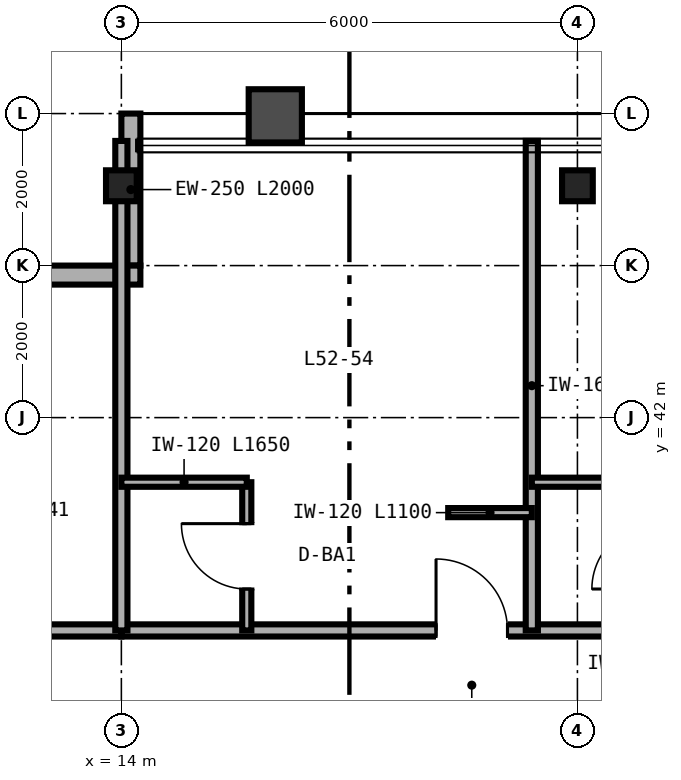
"""IFC4 building model, lengths in metres.
Left out: names, types, materials, properties, quantities, classifications, styles, units other than length and angle.
Written with IfcOpenShell. Run it as: python <this file> out.ifc"""

import sys

from ifc_helpers import new_model, si_unit, direction, frame, frame_2d, origin, origin_2d, place, context, subcontext, project, spatial, rectangle, i_section, extrude, source, transform, mapped, element, fill, save


model = new_model("IFC4")
c1 = context("Model", 3, precision=1e-05, world=origin(), true_north=direction((0.0, 1.0)))
c2 = subcontext(c1, "Body", "Model", "MODEL_VIEW")
j1 = project(units=[si_unit("LENGTHUNIT", "METRE"), si_unit("PLANEANGLEUNIT", "RADIAN")], contexts=[c1])
p1 = place(None, origin())
s1 = spatial("IfcSite", under=j1, at=p1, CompositionType="ELEMENT")
p2 = place(p1, origin())
s2 = spatial("IfcBuilding", under=s1, at=p2, CompositionType="ELEMENT")
p3 = place(p2, frame((0.0, 0.0, 206.4)))
s3 = spatial("IfcBuildingStorey", under=s2, at=p3, CompositionType="ELEMENT", Elevation=206.4)
m1 = source(origin(), c2, "Body", "SweptSolid", [
    extrude(i_section(OverallWidth=0.404, OverallDepth=0.407, WebThickness=0.027, FlangeThickness=0.044, FilletRadius=0.025, at=origin_2d()), origin(), (0.0, 0.0, 1.0), 3.37),
])
for number, where, z_axis, x_axis in (
    (1, (14.0, 45.05, 0.0), (0.0, 0.0, 1.0), (1.0, 0.0, 0.0)),
    (2, (20.0, 45.05, 0.0), (0.0, 0.0, 1.0), (1.0, 0.0, 0.0)),
):
    element("IfcColumn", number, at=place(p3, frame(where, z_axis=z_axis, x_axis=x_axis)), inside=s3, PredefinedType="COLUMN", context=c2, shape_type="MappedRepresentation", body=[
        mapped(m1, transform((0.0, 0.0, 0.0), scale=1.0)),
    ])
p4 = place(p3, frame((14.125, 46.0, 0.0), z_axis=(0.0, 0.0, 1.0), x_axis=(0.0, -1.0, 0.0)))
e3 = element("IfcWall", 3, at=p4, inside=s3, PredefinedType="SOLIDWALL", context=c2, shape_type="SweptSolid", body=[
    extrude(rectangle(XDim=2.0, YDim=0.25, at=frame_2d((1.0, 0.0))), origin(), (0.0, 0.0, 1.0), 2.677),
])
p5 = place(p3, frame((14.25, 43.875, 0.0), z_axis=(0.0, 0.0, 1.0), x_axis=(-1.0, 0.0, 0.0)))
e4 = element("IfcWall", 4, at=p5, inside=s3, PredefinedType="SOLIDWALL", context=c2, shape_type="SweptSolid", body=[
    extrude(rectangle(XDim=2.0, YDim=0.25, at=frame_2d((1.0, 0.0))), origin(), (0.0, 0.0, 1.0), 3.37),
])
p6 = place(p3, frame((10.0, 39.2, 0.0), z_axis=(0.0, 0.0, 1.0), x_axis=(1.0, 0.0, 0.0)))
e5 = element("IfcWall", 5, at=p6, inside=s3, PredefinedType="PARTITIONING", context=c2, shape_type="SweptSolid", body=[
    extrude(rectangle(XDim=4.0, YDim=0.16, at=frame_2d((2.0, 0.0))), origin(), (0.0, 0.0, 1.0), 3.37),
])
p7 = place(p6, frame((1.52, 0.0, 0.0)))
e6 = element("IfcOpeningElement", 6, at=p7, cuts=e5, PredefinedType="OPENING", context=c2, shape_type="SweptSolid", body=[
    extrude(rectangle(XDim=0.96, YDim=2.15, at=frame_2d((0.48, 1.075))), frame((0.0, 0.09, 0.0), z_axis=(0.0, -1.0, 0.0), x_axis=(1.0, 0.0, 0.0)), (0.0, 0.0, 1.0), 0.18),
])
p8 = place(p3, frame((14.0, 39.2, 0.0), z_axis=(0.0, 0.0, 1.0), x_axis=(1.0, 0.0, 0.0)))
e7 = element("IfcWall", 7, at=p8, inside=s3, PredefinedType="PARTITIONING", context=c2, shape_type="SweptSolid", body=[
    extrude(rectangle(XDim=36.0, YDim=0.16, at=frame_2d((18.0, 0.0))), origin(), (0.0, 0.0, 1.0), 2.913),
])
p9 = place(p8, frame((4.14, 0.0, 0.0)))
e8 = element("IfcOpeningElement", 8, at=p9, cuts=e7, PredefinedType="OPENING", context=c2, shape_type="SweptSolid", body=[
    extrude(rectangle(XDim=0.94, YDim=2.15, at=frame_2d((0.47, 1.075))), frame((0.0, 0.09, 0.0), z_axis=(0.0, -1.0, 0.0), x_axis=(1.0, 0.0, 0.0)), (0.0, 0.0, 1.0), 0.18),
])
p10 = place(p8, frame((9.54, 0.0, 0.0)))
e9 = element("IfcOpeningElement", 9, at=p10, cuts=e7, PredefinedType="OPENING", context=c2, shape_type="SweptSolid", body=[
    extrude(rectangle(XDim=0.94, YDim=2.15, at=frame_2d((0.47, 1.075))), frame((0.0, 0.09, 0.0), z_axis=(0.0, -1.0, 0.0), x_axis=(1.0, 0.0, 0.0)), (0.0, 0.0, 1.0), 0.18),
])
p11 = place(p8, frame((13.32, 0.0, 0.0)))
e10 = element("IfcOpeningElement", 10, at=p11, cuts=e7, PredefinedType="OPENING", context=c2, shape_type="SweptSolid", body=[
    extrude(rectangle(XDim=0.96, YDim=2.15, at=frame_2d((0.48, 1.075))), frame((0.0, 0.09, 0.0), z_axis=(0.0, -1.0, 0.0), x_axis=(1.0, 0.0, 0.0)), (0.0, 0.0, 1.0), 0.18),
])
p12 = place(p8, frame((21.54, 0.0, 0.0)))
e11 = element("IfcOpeningElement", 11, at=p12, cuts=e7, PredefinedType="OPENING", context=c2, shape_type="SweptSolid", body=[
    extrude(rectangle(XDim=0.94, YDim=2.15, at=frame_2d((0.47, 1.075))), frame((0.0, 0.09, 0.0), z_axis=(0.0, -1.0, 0.0), x_axis=(1.0, 0.0, 0.0)), (0.0, 0.0, 1.0), 0.18),
])
p13 = place(p8, frame((28.14, 0.0, 0.0)))
e12 = element("IfcOpeningElement", 12, at=p13, cuts=e7, PredefinedType="OPENING", context=c2, shape_type="SweptSolid", body=[
    extrude(rectangle(XDim=0.94, YDim=2.15, at=frame_2d((0.47, 1.075))), frame((0.0, 0.09, 0.0), z_axis=(0.0, -1.0, 0.0), x_axis=(1.0, 0.0, 0.0)), (0.0, 0.0, 1.0), 0.18),
])
p14 = place(p8, frame((34.74, 0.0, 0.0)))
e13 = element("IfcOpeningElement", 13, at=p14, cuts=e7, PredefinedType="OPENING", context=c2, shape_type="SweptSolid", body=[
    extrude(rectangle(XDim=0.94, YDim=2.15, at=frame_2d((0.47, 1.075))), frame((0.0, 0.09, 0.0), z_axis=(0.0, -1.0, 0.0), x_axis=(1.0, 0.0, 0.0)), (0.0, 0.0, 1.0), 0.18),
])
for number, where, z_axis, x_axis in (
    (14, (14.0, 39.2, 0.0), (0.0, 0.0, 1.0), (0.0, 1.0, 0.0)),
    (15, (19.4, 39.2, 0.0), (0.0, 0.0, 1.0), (0.0, 1.0, 0.0)),
):
    element("IfcWall", number, at=place(p3, frame(where, z_axis=z_axis, x_axis=x_axis)), inside=s3, PredefinedType="PARTITIONING", context=c2, shape_type="SweptSolid", body=[
        extrude(rectangle(XDim=6.44, YDim=0.16, at=frame_2d((3.22, 0.0))), origin(), (0.0, 0.0, 1.0), 2.677),
    ])
p15 = place(p3, frame((15.65, 39.2, 0.0), z_axis=(0.0, 0.0, 1.0), x_axis=(0.0, 1.0, 0.0)))
e16 = element("IfcWall", 16, at=p15, inside=s3, PredefinedType="PARTITIONING", context=c2, shape_type="SweptSolid", body=[
    extrude(rectangle(XDim=1.95, YDim=0.12, at=frame_2d((0.975, 0.0))), origin(), (0.0, 0.0, 1.0), 3.37),
])
p16 = place(p15, frame((0.545, 0.0, 0.0)))
e17 = element("IfcOpeningElement", 17, at=p16, cuts=e16, PredefinedType="OPENING", context=c2, shape_type="SweptSolid", body=[
    extrude(rectangle(XDim=0.86, YDim=2.1, at=frame_2d((0.43, 1.05))), frame((0.0, 0.07, 0.0), z_axis=(0.0, -1.0, 0.0), x_axis=(1.0, 0.0, 0.0)), (0.0, 0.0, 1.0), 0.14),
])
p17 = place(p3, frame((14.0, 41.15, 0.0), z_axis=(0.0, 0.0, 1.0), x_axis=(1.0, 0.0, 0.0)))
e18 = element("IfcWall", 18, at=p17, inside=s3, PredefinedType="PARTITIONING", context=c2, shape_type="SweptSolid", body=[
    extrude(rectangle(XDim=1.65, YDim=0.12, at=frame_2d((0.825, 0.0))), origin(), (0.0, 0.0, 1.0), 3.37),
])
p18 = place(p3, frame((18.3, 40.75, 0.0), z_axis=(0.0, 0.0, 1.0), x_axis=(1.0, 0.0, 0.0)))
e19 = element("IfcWall", 19, at=p18, inside=s3, PredefinedType="PARTITIONING", context=c2, shape_type="SweptSolid", body=[
    extrude(rectangle(XDim=1.1, YDim=0.12, at=frame_2d((0.55, 0.0))), origin(), (0.0, 0.0, 1.0), 3.37),
])
p19 = place(p3, frame((19.4, 41.15, 0.0), z_axis=(0.0, 0.0, 1.0), x_axis=(1.0, 0.0, 0.0)))
e20 = element("IfcWall", 20, at=p19, inside=s3, PredefinedType="PARTITIONING", context=c2, shape_type="SweptSolid", body=[
    extrude(rectangle(XDim=1.65, YDim=0.12, at=frame_2d((0.825, 0.0))), origin(), (0.0, 0.0, 1.0), 3.37),
])
m2 = source(origin(), c2, "Body", "SweptSolid", [
    extrude(rectangle(XDim=0.86, YDim=2.1, at=frame_2d((0.43, 1.05))), frame((0.0, 0.025, 0.0), z_axis=(0.0, -1.0, 0.0), x_axis=(1.0, 0.0, 0.0)), (0.0, 0.0, 1.0), 0.05),
])
p20 = place(p16, origin())
e21 = element("IfcDoor", 21, at=p20, inside=s3, OperationType="SINGLE_SWING_RIGHT", PredefinedType="DOOR", context=c2, shape_type="MappedRepresentation", body=[
    mapped(m2, transform((0.0, 0.0, 0.0), scale=1.0)),
])
fill(e17, e21)
m3 = source(origin(), c2, "Body", "SweptSolid", [
    extrude(rectangle(XDim=0.94, YDim=2.15, at=frame_2d((0.47, 1.075))), frame((0.0, 0.025, 0.0), z_axis=(0.0, -1.0, 0.0), x_axis=(1.0, 0.0, 0.0)), (0.0, 0.0, 1.0), 0.05),
])
p21 = place(p9, origin())
e22 = element("IfcDoor", 22, at=p21, inside=s3, OperationType="SINGLE_SWING_LEFT", PredefinedType="DOOR", context=c2, shape_type="MappedRepresentation", body=[
    mapped(m3, transform((0.0, 0.0, 0.0), scale=1.0)),
])
fill(e8, e22)
save(model, sys.argv[1])
